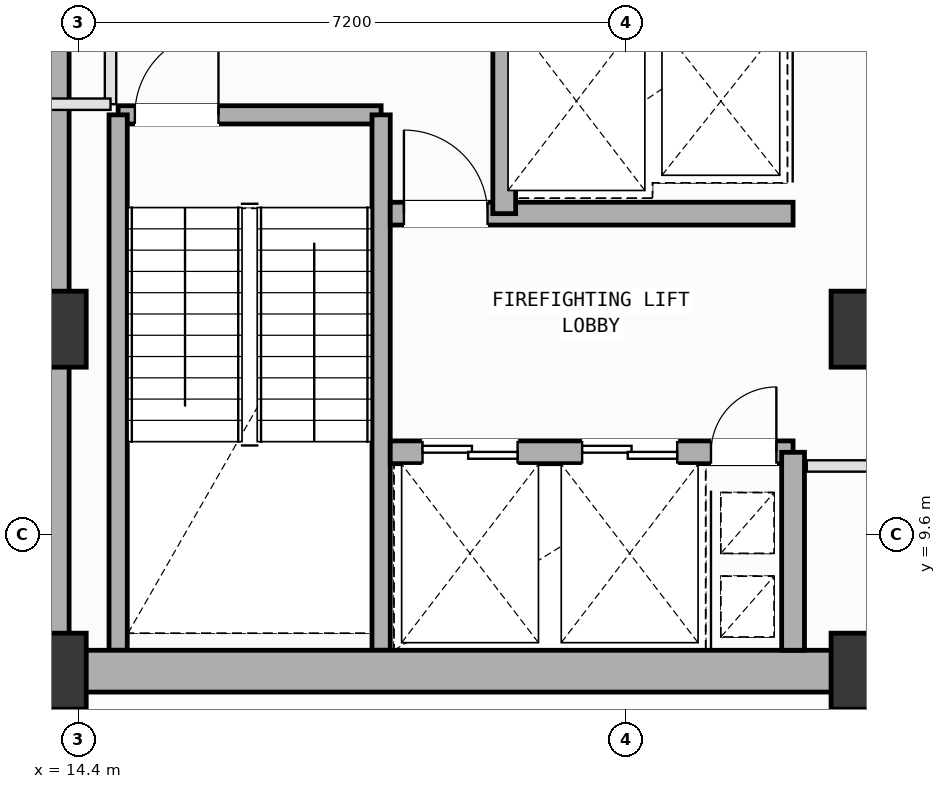
"""IFC4 building model, lengths in metres.
Left out: names, types, materials, properties, quantities, classifications, styles, units other than length and angle.
Written with IfcOpenShell. Run it as: python <this file> out.ifc"""

import sys

from ifc_helpers import new_model, si_unit, direction, frame, frame_2d, origin, origin_2d, place, context, subcontext, project, spatial, rectangle, extrude, element, fill, save


model = new_model("IFC4")
c1 = context("Model", 3, precision=1e-05, world=origin(), true_north=direction((0.0, 1.0)))
c2 = subcontext(c1, "Body", "Model", "MODEL_VIEW")
j1 = project(units=[si_unit("LENGTHUNIT", "METRE"), si_unit("PLANEANGLEUNIT", "RADIAN")], contexts=[c1])
p1 = place(None, origin())
s1 = spatial("IfcSite", under=j1, at=p1, CompositionType="ELEMENT")
p2 = place(p1, origin())
s2 = spatial("IfcBuilding", under=s1, at=p2, CompositionType="ELEMENT")
p3 = place(p2, frame((0.0, 0.0, 239.2)))
s3 = spatial("IfcBuildingStorey", under=s2, at=p3, CompositionType="ELEMENT", Elevation=239.2)
for number, where, z_axis, x_axis in (
    (1, (14.0, 7.8, 0.0), (0.0, 0.0, 1.0), (1.0, 0.0, 0.0)),
    (2, (14.0, 12.3, 0.0), (0.0, 0.0, 1.0), (1.0, 0.0, 0.0)),
    (3, (24.8, 7.8, 0.0), (0.0, 0.0, 1.0), (1.0, 0.0, 0.0)),
    (4, (24.8, 12.3, 0.0), (0.0, 0.0, 1.0), (1.0, 0.0, 0.0)),
):
    element("IfcColumn", number, at=place(p3, frame(where, z_axis=z_axis, x_axis=x_axis)), inside=s3, PredefinedType="COLUMN", context=c2, shape_type="SweptSolid", body=[
        extrude(rectangle(XDim=1.0, YDim=1.0, at=origin_2d()), origin(), (0.0, 0.0, 1.0), 4.0),
    ])
p4 = place(p3, frame((14.452, 5.017, 0.0), z_axis=(0.0, 0.0, 1.0), x_axis=(-0.769946129404, 0.638108891817, 0.0)))
e5 = element("IfcWall", 5, at=p4, inside=s3, PredefinedType="SOLIDWALL", context=c2, shape_type="SweptSolid", body=[
    extrude(rectangle(XDim=5.861, YDim=0.28, at=frame_2d((2.931, 0.0))), origin(), (0.0, 0.0, 1.0), 3.265),
])
p5 = place(p4, frame((1.073, 0.0, 0.75)))
e6 = element("IfcOpeningElement", 6, at=p5, cuts=e5, PredefinedType="OPENING", context=c2, shape_type="SweptSolid", body=[
    extrude(rectangle(XDim=1.6, YDim=1.95, at=frame_2d((0.8, 0.975))), frame((0.0, 0.15, 0.0), z_axis=(0.0, -1.0, 0.0), x_axis=(1.0, 0.0, 0.0)), (0.0, 0.0, 1.0), 0.3),
])
p6 = place(p3, frame((14.92, 15.12, 0.0), z_axis=(0.0, 0.0, 1.0), x_axis=(1.0, 0.0, 0.0)))
e7 = element("IfcWall", 7, at=p6, inside=s3, PredefinedType="SOLIDWALL", context=c2, shape_type="SweptSolid", body=[
    extrude(rectangle(XDim=3.46, YDim=0.24, at=frame_2d((1.73, 0.0))), origin(), (0.0, 0.0, 1.0), 3.78),
])
p7 = place(p6, frame((0.22, 0.0, 0.0)))
e8 = element("IfcOpeningElement", 8, at=p7, cuts=e7, PredefinedType="OPENING", context=c2, shape_type="SweptSolid", body=[
    extrude(rectangle(XDim=1.1, YDim=2.15, at=frame_2d((0.55, 1.075))), frame((0.0, 0.13, 0.0), z_axis=(0.0, -1.0, 0.0), x_axis=(1.0, 0.0, 0.0)), (0.0, 0.0, 1.0), 0.26),
])
for number, where, z_axis, x_axis in (
    (9, (18.38, 15.12, 0.0), (0.0, 0.0, 1.0), (0.0, -1.0, 0.0)),
    (10, (14.92, 8.075, 0.0), (0.0, 0.0, 1.0), (0.0, 1.0, 0.0)),
):
    element("IfcWall", number, at=place(p3, frame(where, z_axis=z_axis, x_axis=x_axis)), inside=s3, PredefinedType="SOLIDWALL", context=c2, shape_type="SweptSolid", body=[
        extrude(rectangle(XDim=7.045, YDim=0.24, at=frame_2d((3.522, 0.0))), origin(), (0.0, 0.0, 1.0), 3.78),
    ])
p8 = place(p3, frame((14.0, 7.8, 0.0), z_axis=(0.0, 0.0, 1.0), x_axis=(1.0, 0.0, 0.0)))
e11 = element("IfcWall", 11, at=p8, inside=s3, PredefinedType="SHEAR", context=c2, shape_type="SweptSolid", body=[
    extrude(rectangle(XDim=10.8, YDim=0.55, at=frame_2d((5.4, 0.0))), origin(), (0.0, 0.0, 1.0), 3.78),
])
p9 = place(p3, frame((14.0, 16.8, 0.0), z_axis=(0.0, 0.0, 1.0), x_axis=(0.0, -1.0, 0.0)))
e12 = element("IfcWall", 12, at=p9, inside=s3, PredefinedType="SHEAR", context=c2, shape_type="SweptSolid", body=[
    extrude(rectangle(XDim=9.0, YDim=0.55, at=frame_2d((4.5, 0.0))), origin(), (0.0, 0.0, 1.0), 3.78),
])
p10 = place(p3, frame((18.5, 10.68, 0.0), z_axis=(0.0, 0.0, 1.0), x_axis=(1.0, 0.0, 0.0)))
e13 = element("IfcWall", 13, at=p10, inside=s3, PredefinedType="SOLIDWALL", context=c2, shape_type="SweptSolid", body=[
    extrude(rectangle(XDim=5.3, YDim=0.3, at=frame_2d((2.65, 0.0))), origin(), (0.0, 0.0, 1.0), 3.78),
])
p11 = place(p10, frame((4.22, 0.0, 0.0)))
e14 = element("IfcOpeningElement", 14, at=p11, cuts=e13, PredefinedType="OPENING", context=c2, shape_type="SweptSolid", body=[
    extrude(rectangle(XDim=0.86, YDim=2.06, at=frame_2d((0.43, 1.03))), frame((0.0, 0.16, 0.0), z_axis=(0.0, -1.0, 0.0), x_axis=(1.0, 0.0, 0.0)), (0.0, 0.0, 1.0), 0.32),
])
p12 = place(p10, frame((0.425, 0.0, 0.0)))
e15 = element("IfcOpeningElement", 15, at=p12, cuts=e13, PredefinedType="OPENING", context=c2, shape_type="SweptSolid", body=[
    extrude(rectangle(XDim=1.25, YDim=2.18, at=frame_2d((0.625, 1.09))), frame((0.0, 0.16, 0.0), z_axis=(0.0, -1.0, 0.0), x_axis=(1.0, 0.0, 0.0)), (0.0, 0.0, 1.0), 0.32),
])
p13 = place(p10, frame((2.525, 0.0, 0.0)))
e16 = element("IfcOpeningElement", 16, at=p13, cuts=e13, PredefinedType="OPENING", context=c2, shape_type="SweptSolid", body=[
    extrude(rectangle(XDim=1.25, YDim=2.18, at=frame_2d((0.625, 1.09))), frame((0.0, 0.16, 0.0), z_axis=(0.0, -1.0, 0.0), x_axis=(1.0, 0.0, 0.0)), (0.0, 0.0, 1.0), 0.32),
])
p14 = place(p3, frame((18.5, 13.82, 0.0), z_axis=(0.0, 0.0, 1.0), x_axis=(1.0, 0.0, 0.0)))
e17 = element("IfcWall", 17, at=p14, inside=s3, PredefinedType="SOLIDWALL", context=c2, shape_type="SweptSolid", body=[
    extrude(rectangle(XDim=5.3, YDim=0.3, at=frame_2d((2.65, 0.0))), origin(), (0.0, 0.0, 1.0), 3.78),
])
p15 = place(p14, frame((0.18, 0.0, 0.0)))
e18 = element("IfcOpeningElement", 18, at=p15, cuts=e17, PredefinedType="OPENING", context=c2, shape_type="SweptSolid", body=[
    extrude(rectangle(XDim=1.1, YDim=2.15, at=frame_2d((0.55, 1.075))), frame((0.0, 0.16, 0.0), z_axis=(0.0, -1.0, 0.0), x_axis=(1.0, 0.0, 0.0)), (0.0, 0.0, 1.0), 0.32),
])
p16 = place(p3, frame((23.8, 8.075, 0.0), z_axis=(0.0, 0.0, 1.0), x_axis=(0.0, 1.0, 0.0)))
e19 = element("IfcWall", 19, at=p16, inside=s3, PredefinedType="SOLIDWALL", context=c2, shape_type="SweptSolid", body=[
    extrude(rectangle(XDim=2.605, YDim=0.3, at=frame_2d((1.302, 0.0))), origin(), (0.0, 0.0, 1.0), 3.78),
])
p17 = place(p3, frame((20.0, 13.82, 0.0), z_axis=(0.0, 0.0, 1.0), x_axis=(0.0, 1.0, 0.0)))
e20 = element("IfcWall", 20, at=p17, inside=s3, PredefinedType="SOLIDWALL", context=c2, shape_type="SweptSolid", body=[
    extrude(rectangle(XDim=2.73, YDim=0.3, at=frame_2d((1.365, 0.0))), origin(), (0.0, 0.0, 1.0), 3.78),
])
p18 = place(p3, frame((23.98, 10.5, 0.0), z_axis=(0.0, 0.0, 1.0), x_axis=(1.0, 0.0, 0.0)))
e21 = element("IfcWall", 21, at=p18, inside=s3, PredefinedType="PARTITIONING", context=c2, shape_type="SweptSolid", body=[
    extrude(rectangle(XDim=5.4, YDim=0.15, at=frame_2d((2.7, 0.0))), origin(), (0.0, 0.0, 1.0), 3.78),
])
p19 = place(p18, frame((3.703, 0.0, 0.0)))
e22 = element("IfcOpeningElement", 22, at=p19, cuts=e21, PredefinedType="OPENING", context=c2, shape_type="SweptSolid", body=[
    extrude(rectangle(XDim=0.86, YDim=2.06, at=frame_2d((0.43, 1.03))), frame((0.0, 0.085, 0.0), z_axis=(0.0, -1.0, 0.0), x_axis=(1.0, 0.0, 0.0)), (0.0, 0.0, 1.0), 0.17),
])
p20 = place(p3, frame((22.818, -1.766, 0.0), z_axis=(0.0, 0.0, 1.0), x_axis=(0.638080601812, 0.769969574458, 0.0)))
e23 = element("IfcWall", 23, at=p20, inside=s3, PredefinedType="PARTITIONING", context=c2, shape_type="SweptSolid", body=[
    extrude(rectangle(XDim=12.262, YDim=0.15, at=frame_2d((6.131, 0.0))), origin(), (0.0, 0.0, 1.0), 3.78),
])
p21 = place(p3, frame((29.752, 7.675, 0.0), z_axis=(0.0, 0.0, 1.0), x_axis=(-0.63808541453, -0.769965586091, 0.0)))
e24 = element("IfcWall", 24, at=p21, inside=s3, PredefinedType="PARTITIONING", context=c2, shape_type="SweptSolid", body=[
    extrude(rectangle(XDim=11.694, YDim=0.15, at=frame_2d((5.847, 0.0))), origin(), (0.0, 0.0, 1.0), 3.78),
])
p22 = place(p3, frame((14.82, 18.2, 0.0), z_axis=(0.0, 0.0, 1.0), x_axis=(0.0, -1.0, 0.0)))
e25 = element("IfcWall", 25, at=p22, inside=s3, PredefinedType="PARTITIONING", context=c2, shape_type="SweptSolid", body=[
    extrude(rectangle(XDim=2.94, YDim=0.15, at=frame_2d((1.47, 0.0))), origin(), (0.0, 0.0, 1.0), 3.78),
])
p23 = place(p3, frame((14.82, 15.26, 0.0), z_axis=(0.0, 0.0, 1.0), x_axis=(-1.0, 0.0, 0.0)))
e26 = element("IfcWall", 26, at=p23, inside=s3, PredefinedType="PARTITIONING", context=c2, shape_type="SweptSolid", body=[
    extrude(rectangle(XDim=1.12, YDim=0.15, at=frame_2d((0.56, 0.0))), origin(), (0.0, 0.0, 1.0), 3.78),
])
p24 = place(p7, origin())
e27 = element("IfcDoor", 27, at=p24, inside=s3, OperationType="SINGLE_SWING_RIGHT", PredefinedType="DOOR", context=c2, shape_type="SweptSolid", body=[
    extrude(rectangle(XDim=1.1, YDim=2.15, at=frame_2d((0.55, 1.075))), frame((0.0, 0.025, 0.0), z_axis=(0.0, -1.0, 0.0), x_axis=(1.0, 0.0, 0.0)), (0.0, 0.0, 1.0), 0.05),
])
fill(e8, e27)
p25 = place(p11, origin())
e28 = element("IfcDoor", 28, at=p25, inside=s3, OperationType="SINGLE_SWING_RIGHT", PredefinedType="DOOR", context=c2, shape_type="SweptSolid", body=[
    extrude(rectangle(XDim=0.86, YDim=2.06, at=frame_2d((0.43, 1.03))), frame((0.0, 0.025, 0.0), z_axis=(0.0, -1.0, 0.0), x_axis=(1.0, 0.0, 0.0)), (0.0, 0.0, 1.0), 0.05),
])
fill(e14, e28)
p26 = place(p15, origin())
e29 = element("IfcDoor", 29, at=p26, inside=s3, OperationType="SINGLE_SWING_LEFT", PredefinedType="DOOR", context=c2, shape_type="SweptSolid", body=[
    extrude(rectangle(XDim=1.1, YDim=2.15, at=frame_2d((0.55, 1.075))), frame((0.0, 0.025, 0.0), z_axis=(0.0, -1.0, 0.0), x_axis=(1.0, 0.0, 0.0)), (0.0, 0.0, 1.0), 0.05),
])
fill(e18, e29)
p27 = place(p12, origin())
e30 = element("IfcDoor", 30, at=p27, inside=s3, OperationType="DOUBLE_DOOR_SLIDING", PredefinedType="DOOR", context=c2, shape_type="SweptSolid", body=[
    extrude(rectangle(XDim=1.25, YDim=2.18, at=frame_2d((0.625, 1.09))), frame((0.0, 0.025, 0.0), z_axis=(0.0, -1.0, 0.0), x_axis=(1.0, 0.0, 0.0)), (0.0, 0.0, 1.0), 0.05),
])
fill(e15, e30)
p28 = place(p13, origin())
e31 = element("IfcDoor", 31, at=p28, inside=s3, OperationType="DOUBLE_DOOR_SLIDING", PredefinedType="DOOR", context=c2, shape_type="SweptSolid", body=[
    extrude(rectangle(XDim=1.25, YDim=2.18, at=frame_2d((0.625, 1.09))), frame((0.0, 0.025, 0.0), z_axis=(0.0, -1.0, 0.0), x_axis=(1.0, 0.0, 0.0)), (0.0, 0.0, 1.0), 0.05),
])
fill(e16, e31)
save(model, sys.argv[1])
